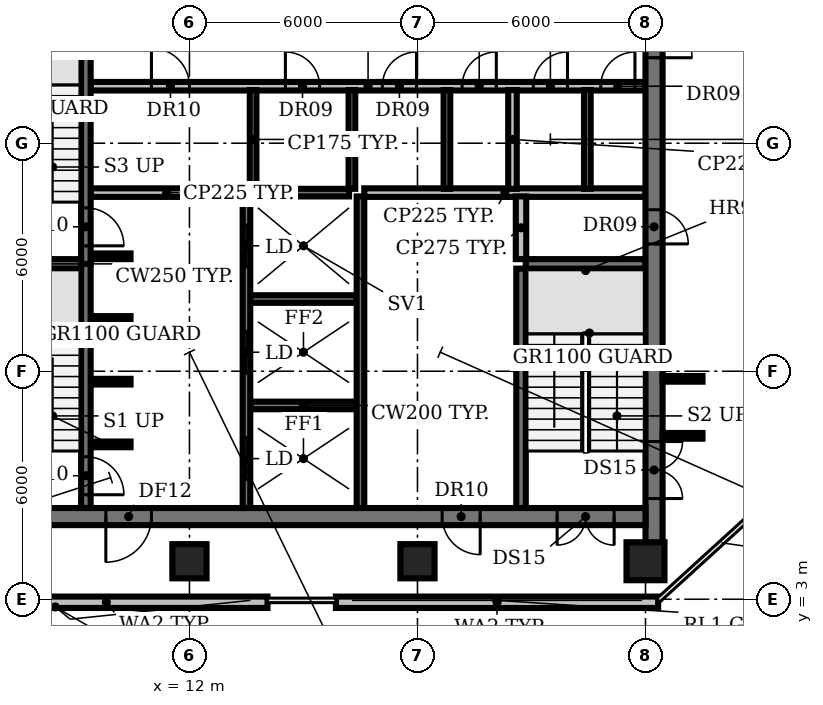
"""IFC4 building model, lengths in metres.
Left out: names, types, materials, properties, quantities, classifications, styles, units other than length and angle.
Written with IfcOpenShell. Run it as: python <this file> out.ifc"""

import sys

from ifc_helpers import new_model, si_unit, direction, frame, frame_2d, origin, origin_2d, place, context, subcontext, project, spatial, rectangle, circle, extrude, element, fill, save


model = new_model("IFC4")
c1 = context("Model", 3, precision=1e-05, world=origin(), true_north=direction((0.0, 1.0)))
c2 = subcontext(c1, "Body", "Model", "MODEL_VIEW")
j1 = project(units=[si_unit("LENGTHUNIT", "METRE"), si_unit("PLANEANGLEUNIT", "RADIAN")], contexts=[c1])
p1 = place(None, origin())
s1 = spatial("IfcSite", under=j1, at=p1, CompositionType="ELEMENT")
p2 = place(p1, origin())
s2 = spatial("IfcBuilding", under=s1, at=p2, CompositionType="ELEMENT")
p3 = place(p2, frame((0.0, 0.0, 205.4)))
s3 = spatial("IfcBuildingStorey", under=s2, at=p3, CompositionType="ELEMENT", Elevation=205.4)
for number, where, z_axis, x_axis in (
    (1, (12.0, 4.0, -0.35), (0.0, 0.0, 1.0), (1.0, 0.0, 0.0)),
    (2, (18.0, 4.0, -0.35), (0.0, 0.0, 1.0), (1.0, 0.0, 0.0)),
):
    element("IfcColumn", number, at=place(p3, frame(where, z_axis=z_axis, x_axis=x_axis)), inside=s3, PredefinedType="COLUMN", context=c2, shape_type="SweptSolid", body=[
        extrude(rectangle(XDim=0.9, YDim=0.9, at=origin_2d()), origin(), (0.0, 0.0, 1.0), 4.2),
    ])
p4 = place(p3, frame((24.0, 4.0, -0.35), z_axis=(0.0, 0.0, 1.0), x_axis=(1.0, 0.0, 0.0)))
e3 = element("IfcColumn", 3, at=p4, inside=s3, PredefinedType="COLUMN", context=c2, shape_type="SweptSolid", body=[
    extrude(circle(Radius=0.5, at=origin_2d()), origin(), (0.0, 0.0, 1.0), 4.2),
])
for number, where, z_axis, x_axis in (
    (4, (5.573, 2.92, 0.0), (0.0, 0.0, 1.0), (1.0, 0.0, 0.0)),
    (5, (15.854, 2.92, 0.0), (0.0, 0.0, 1.0), (1.0, 0.0, 0.0)),
):
    element("IfcWall", number, at=place(p3, frame(where, z_axis=z_axis, x_axis=x_axis)), inside=s3, PredefinedType="SOLIDWALL", context=c2, shape_type="SweptSolid", body=[
        extrude(rectangle(XDim=8.48, YDim=0.3, at=frame_2d((4.24, 0.0))), origin(), (0.0, 0.0, 1.0), 3.85),
    ])
p5 = place(p3, frame((9.4, 7.075, 0.0), z_axis=(0.0, 0.0, 1.0), x_axis=(1.0, 0.0, 0.0)))
e6 = element("IfcWall", 6, at=p5, inside=s3, PredefinedType="SHEAR", context=c2, shape_type="SweptSolid", body=[
    extrude(rectangle(XDim=1.05, YDim=0.15, at=frame_2d((0.525, 0.0))), origin(), (0.0, 0.0, 1.0), 3.85),
])
p6 = place(p3, frame((13.6, 8.1, 0.0), z_axis=(0.0, 0.0, 1.0), x_axis=(1.0, 0.0, 0.0)))
e7 = element("IfcWall", 7, at=p6, inside=s3, PredefinedType="SHEAR", context=c2, shape_type="SweptSolid", body=[
    extrude(rectangle(XDim=2.8, YDim=0.2, at=frame_2d((1.4, 0.0))), origin(), (0.0, 0.0, 1.0), 3.85),
])
for number, where, z_axis, x_axis in (
    (8, (9.4, 8.725, 0.0), (0.0, 0.0, 1.0), (1.0, 0.0, 0.0)),
    (9, (9.4, 10.375, 0.0), (0.0, 0.0, 1.0), (1.0, 0.0, 0.0)),
):
    element("IfcWall", number, at=place(p3, frame(where, z_axis=z_axis, x_axis=x_axis)), inside=s3, PredefinedType="SHEAR", context=c2, shape_type="SweptSolid", body=[
        extrude(rectangle(XDim=1.05, YDim=0.15, at=frame_2d((0.525, 0.0))), origin(), (0.0, 0.0, 1.0), 3.85),
    ])
p7 = place(p3, frame((13.6, 10.9, 0.0), z_axis=(0.0, 0.0, 1.0), x_axis=(1.0, 0.0, 0.0)))
e10 = element("IfcWall", 10, at=p7, inside=s3, PredefinedType="SHEAR", context=c2, shape_type="SweptSolid", body=[
    extrude(rectangle(XDim=2.8, YDim=0.2, at=frame_2d((1.4, 0.0))), origin(), (0.0, 0.0, 1.0), 3.85),
])
for number, where, z_axis, x_axis in (
    (11, (6.0, 11.825, 0.0), (0.0, 0.0, 1.0), (1.0, 0.0, 0.0)),
    (12, (20.85, 11.825, 0.0), (0.0, 0.0, 1.0), (1.0, 0.0, 0.0)),
):
    element("IfcWall", number, at=place(p3, frame(where, z_axis=z_axis, x_axis=x_axis)), inside=s3, PredefinedType="SHEAR", context=c2, shape_type="SweptSolid", body=[
        extrude(rectangle(XDim=3.15, YDim=0.25, at=frame_2d((1.575, 0.0))), origin(), (0.0, 0.0, 1.0), 3.85),
    ])
p8 = place(p3, frame((9.4, 12.025, 0.0), z_axis=(0.0, 0.0, 1.0), x_axis=(1.0, 0.0, 0.0)))
e13 = element("IfcWall", 13, at=p8, inside=s3, PredefinedType="SHEAR", context=c2, shape_type="SweptSolid", body=[
    extrude(rectangle(XDim=1.05, YDim=0.15, at=frame_2d((0.525, 0.0))), origin(), (0.0, 0.0, 1.0), 3.85),
])
p9 = place(p3, frame((9.4, 13.7, 0.0), z_axis=(0.0, 0.0, 1.0), x_axis=(1.0, 0.0, 0.0)))
e14 = element("IfcWall", 14, at=p9, inside=s3, PredefinedType="PARTITIONING", context=c2, shape_type="SweptSolid", body=[
    extrude(rectangle(XDim=4.0, YDim=0.225, at=frame_2d((2.0, 0.0))), origin(), (0.0, 0.0, 1.0), 3.85),
])
p10 = place(p3, frame((13.75, 13.7, 0.0), z_axis=(0.0, 0.0, 1.0), x_axis=(1.0, 0.0, 0.0)))
e15 = element("IfcWall", 15, at=p10, inside=s3, PredefinedType="SHEAR", context=c2, shape_type="SweptSolid", body=[
    extrude(rectangle(XDim=2.45, YDim=0.2, at=frame_2d((1.225, 0.0))), origin(), (0.0, 0.0, 1.0), 3.85),
])
p11 = place(p3, frame((16.6, 13.7, 0.0), z_axis=(0.0, 0.0, 1.0), x_axis=(1.0, 0.0, 0.0)))
e16 = element("IfcWall", 16, at=p11, inside=s3, PredefinedType="PARTITIONING", context=c2, shape_type="SweptSolid", body=[
    extrude(rectangle(XDim=7.4, YDim=0.225, at=frame_2d((3.7, 0.0))), origin(), (0.0, 0.0, 1.0), 3.85),
])
p12 = place(p3, frame((9.4, 16.5, 0.0), z_axis=(0.0, 0.0, 1.0), x_axis=(1.0, 0.0, 0.0)))
e17 = element("IfcWall", 17, at=p12, inside=s3, PredefinedType="PARTITIONING", context=c2, shape_type="SweptSolid", body=[
    extrude(rectangle(XDim=14.6, YDim=0.225, at=frame_2d((7.3, 0.0))), origin(), (0.0, 0.0, 1.0), 3.85),
])
p13 = place(p12, frame((1.6, 0.0, 0.0)))
e18 = element("IfcOpeningElement", 18, at=p13, cuts=e17, PredefinedType="OPENING", context=c2, shape_type="SweptSolid", body=[
    extrude(rectangle(XDim=1.0, YDim=2.1, at=frame_2d((0.5, 1.05))), frame((0.0, 0.123, 0.0), z_axis=(0.0, -1.0, 0.0), x_axis=(1.0, 0.0, 0.0)), (0.0, 0.0, 1.0), 0.245),
])
p14 = place(p12, frame((5.125, 0.0, 0.0)))
e19 = element("IfcOpeningElement", 19, at=p14, cuts=e17, PredefinedType="OPENING", context=c2, shape_type="SweptSolid", body=[
    extrude(rectangle(XDim=0.9, YDim=2.1, at=frame_2d((0.45, 1.05))), frame((0.0, 0.123, 0.0), z_axis=(0.0, -1.0, 0.0), x_axis=(1.0, 0.0, 0.0)), (0.0, 0.0, 1.0), 0.245),
])
p15 = place(p12, frame((7.675, 0.0, 0.0)))
e20 = element("IfcOpeningElement", 20, at=p15, cuts=e17, PredefinedType="OPENING", context=c2, shape_type="SweptSolid", body=[
    extrude(rectangle(XDim=0.9, YDim=2.1, at=frame_2d((0.45, 1.05))), frame((0.0, 0.123, 0.0), z_axis=(0.0, -1.0, 0.0), x_axis=(1.0, 0.0, 0.0)), (0.0, 0.0, 1.0), 0.245),
])
p16 = place(p12, frame((9.775, 0.0, 0.0)))
e21 = element("IfcOpeningElement", 21, at=p16, cuts=e17, PredefinedType="OPENING", context=c2, shape_type="SweptSolid", body=[
    extrude(rectangle(XDim=0.9, YDim=2.1, at=frame_2d((0.45, 1.05))), frame((0.0, 0.123, 0.0), z_axis=(0.0, -1.0, 0.0), x_axis=(1.0, 0.0, 0.0)), (0.0, 0.0, 1.0), 0.245),
])
p17 = place(p12, frame((11.647, 0.0, 0.0)))
e22 = element("IfcOpeningElement", 22, at=p17, cuts=e17, PredefinedType="OPENING", context=c2, shape_type="SweptSolid", body=[
    extrude(rectangle(XDim=0.9, YDim=2.1, at=frame_2d((0.45, 1.05))), frame((0.0, 0.123, 0.0), z_axis=(0.0, -1.0, 0.0), x_axis=(1.0, 0.0, 0.0)), (0.0, 0.0, 1.0), 0.245),
])
p18 = place(p12, frame((13.423, 0.0, 0.0)))
e23 = element("IfcOpeningElement", 23, at=p18, cuts=e17, PredefinedType="OPENING", context=c2, shape_type="SweptSolid", body=[
    extrude(rectangle(XDim=0.9, YDim=2.1, at=frame_2d((0.45, 1.05))), frame((0.0, 0.123, 0.0), z_axis=(0.0, -1.0, 0.0), x_axis=(1.0, 0.0, 0.0)), (0.0, 0.0, 1.0), 0.245),
])
p19 = place(p3, frame((9.275, 11.825, 0.0), z_axis=(0.0, 0.0, 1.0), x_axis=(0.0, -1.0, 0.0)))
e24 = element("IfcWall", 24, at=p19, inside=s3, PredefinedType="SHEAR", context=c2, shape_type="SweptSolid", body=[
    extrude(rectangle(XDim=6.425, YDim=0.25, at=frame_2d((3.212, 0.0))), origin(), (0.0, 0.0, 1.0), 3.85),
])
p20 = place(p19, frame((5.075, 0.0, 0.0)))
e25 = element("IfcOpeningElement", 25, at=p20, cuts=e24, PredefinedType="OPENING", context=c2, shape_type="SweptSolid", body=[
    extrude(rectangle(XDim=1.0, YDim=2.1, at=frame_2d((0.5, 1.05))), frame((0.0, 0.135, 0.0), z_axis=(0.0, -1.0, 0.0), x_axis=(1.0, 0.0, 0.0)), (0.0, 0.0, 1.0), 0.27),
])
p21 = place(p3, frame((9.275, 18.375, 0.0), z_axis=(0.0, 0.0, 1.0), x_axis=(0.0, -1.0, 0.0)))
e26 = element("IfcWall", 26, at=p21, inside=s3, PredefinedType="SHEAR", context=c2, shape_type="SweptSolid", body=[
    extrude(rectangle(XDim=6.55, YDim=0.25, at=frame_2d((3.275, 0.0))), origin(), (0.0, 0.0, 1.0), 3.85),
])
p22 = place(p21, frame((5.075, 0.0, 0.0)))
e27 = element("IfcOpeningElement", 27, at=p22, cuts=e26, PredefinedType="OPENING", context=c2, shape_type="SweptSolid", body=[
    extrude(rectangle(XDim=1.0, YDim=2.1, at=frame_2d((0.5, 1.05))), frame((0.0, 0.135, 0.0), z_axis=(0.0, -1.0, 0.0), x_axis=(1.0, 0.0, 0.0)), (0.0, 0.0, 1.0), 0.27),
])
p23 = place(p3, frame((13.5, 5.4, 0.0), z_axis=(0.0, 0.0, 1.0), x_axis=(0.0, 1.0, 0.0)))
e28 = element("IfcWall", 28, at=p23, inside=s3, PredefinedType="SHEAR", context=c2, shape_type="SweptSolid", body=[
    extrude(rectangle(XDim=8.2, YDim=0.2, at=frame_2d((4.1, 0.0))), origin(), (0.0, 0.0, 1.0), 3.85),
])
p24 = place(p23, frame((0.75, 0.0, 0.0)))
e29 = element("IfcOpeningElement", 29, at=p24, cuts=e28, PredefinedType="OPENING", context=c2, shape_type="SweptSolid", body=[
    extrude(rectangle(XDim=1.1, YDim=2.1, at=frame_2d((0.55, 1.05))), frame((0.0, 0.11, 0.0), z_axis=(0.0, -1.0, 0.0), x_axis=(1.0, 0.0, 0.0)), (0.0, 0.0, 1.0), 0.22),
])
p25 = place(p23, frame((3.55, 0.0, 0.0)))
e30 = element("IfcOpeningElement", 30, at=p25, cuts=e28, PredefinedType="OPENING", context=c2, shape_type="SweptSolid", body=[
    extrude(rectangle(XDim=1.1, YDim=2.1, at=frame_2d((0.55, 1.05))), frame((0.0, 0.11, 0.0), z_axis=(0.0, -1.0, 0.0), x_axis=(1.0, 0.0, 0.0)), (0.0, 0.0, 1.0), 0.22),
])
p26 = place(p23, frame((6.35, 0.0, 0.0)))
e31 = element("IfcOpeningElement", 31, at=p26, cuts=e28, PredefinedType="OPENING", context=c2, shape_type="SweptSolid", body=[
    extrude(rectangle(XDim=1.1, YDim=2.1, at=frame_2d((0.55, 1.05))), frame((0.0, 0.11, 0.0), z_axis=(0.0, -1.0, 0.0), x_axis=(1.0, 0.0, 0.0)), (0.0, 0.0, 1.0), 0.22),
])
for number, where, z_axis, x_axis in (
    (32, (13.675, 13.8, 0.0), (0.0, 0.0, 1.0), (0.0, 1.0, 0.0)),
    (33, (16.275, 13.8, 0.0), (0.0, 0.0, 1.0), (0.0, 1.0, 0.0)),
):
    element("IfcWall", number, at=place(p3, frame(where, z_axis=z_axis, x_axis=x_axis)), inside=s3, PredefinedType="PARTITIONING", context=c2, shape_type="SweptSolid", body=[
        extrude(rectangle(XDim=2.6, YDim=0.175, at=frame_2d((1.3, 0.0))), origin(), (0.0, 0.0, 1.0), 3.85),
    ])
p27 = place(p3, frame((16.5, 5.4, 0.0), z_axis=(0.0, 0.0, 1.0), x_axis=(0.0, 1.0, 0.0)))
e34 = element("IfcWall", 34, at=p27, inside=s3, PredefinedType="SHEAR", context=c2, shape_type="SweptSolid", body=[
    extrude(rectangle(XDim=8.2, YDim=0.2, at=frame_2d((4.1, 0.0))), origin(), (0.0, 0.0, 1.0), 3.85),
])
p28 = place(p3, frame((18.775, 13.8, 0.0), z_axis=(0.0, 0.0, 1.0), x_axis=(0.0, 1.0, 0.0)))
e35 = element("IfcWall", 35, at=p28, inside=s3, PredefinedType="PARTITIONING", context=c2, shape_type="SweptSolid", body=[
    extrude(rectangle(XDim=2.6, YDim=0.175, at=frame_2d((1.3, 0.0))), origin(), (0.0, 0.0, 1.0), 3.85),
])
p29 = place(p3, frame((20.5, 13.8, 0.0), z_axis=(0.0, 0.0, 1.0), x_axis=(0.0, 1.0, 0.0)))
e36 = element("IfcWall", 36, at=p29, inside=s3, PredefinedType="PARTITIONING", context=c2, shape_type="SweptSolid", body=[
    extrude(rectangle(XDim=2.6, YDim=0.225, at=frame_2d((1.3, 0.0))), origin(), (0.0, 0.0, 1.0), 3.85),
])
p30 = place(p3, frame((20.725, 5.4, 0.0), z_axis=(0.0, 0.0, 1.0), x_axis=(0.0, 1.0, 0.0)))
e37 = element("IfcWall", 37, at=p30, inside=s3, PredefinedType="SHEAR", context=c2, shape_type="SweptSolid", body=[
    extrude(rectangle(XDim=6.3, YDim=0.25, at=frame_2d((3.15, 0.0))), origin(), (0.0, 0.0, 1.0), 3.85),
])
p31 = place(p3, frame((20.725, 11.95, 0.0), z_axis=(0.0, 0.0, 1.0), x_axis=(0.0, 1.0, 0.0)))
e38 = element("IfcWall", 38, at=p31, inside=s3, PredefinedType="PARTITIONING", context=c2, shape_type="SweptSolid", body=[
    extrude(rectangle(XDim=1.65, YDim=0.275, at=frame_2d((0.825, 0.0))), origin(), (0.0, 0.0, 1.0), 3.85),
])
p32 = place(p3, frame((22.47, 13.8, 0.0), z_axis=(0.0, 0.0, 1.0), x_axis=(0.0, 1.0, 0.0)))
e39 = element("IfcWall", 39, at=p32, inside=s3, PredefinedType="PARTITIONING", context=c2, shape_type="SweptSolid", body=[
    extrude(rectangle(XDim=2.6, YDim=0.175, at=frame_2d((1.3, 0.0))), origin(), (0.0, 0.0, 1.0), 3.85),
])
p33 = place(p3, frame((24.225, 25.25, 0.0), z_axis=(0.0, 0.0, 1.0), x_axis=(0.0, -1.0, 0.0)))
e40 = element("IfcWall", 40, at=p33, inside=s3, PredefinedType="SHEAR", context=c2, shape_type="SweptSolid", body=[
    extrude(rectangle(XDim=20.78, YDim=0.45, at=frame_2d((10.39, 0.0))), origin(), (0.0, 0.0, 1.0), 3.85),
])
p34 = place(p33, frame((18.1, 0.0, 0.0)))
e41 = element("IfcOpeningElement", 41, at=p34, cuts=e40, PredefinedType="OPENING", context=c2, shape_type="SweptSolid", body=[
    extrude(rectangle(XDim=1.5, YDim=2.1, at=frame_2d((0.75, 1.05))), frame((0.0, 0.235, 0.0), z_axis=(0.0, -1.0, 0.0), x_axis=(1.0, 0.0, 0.0)), (0.0, 0.0, 1.0), 0.47),
])
p35 = place(p33, frame((12.0, 0.0, 0.0)))
e42 = element("IfcOpeningElement", 42, at=p35, cuts=e40, PredefinedType="OPENING", context=c2, shape_type="SweptSolid", body=[
    extrude(rectangle(XDim=0.9, YDim=2.1, at=frame_2d((0.45, 1.05))), frame((0.0, 0.235, 0.0), z_axis=(0.0, -1.0, 0.0), x_axis=(1.0, 0.0, 0.0)), (0.0, 0.0, 1.0), 0.47),
])
p36 = place(p33, frame((6.0, 0.0, 0.0)))
e43 = element("IfcOpeningElement", 43, at=p36, cuts=e40, PredefinedType="OPENING", context=c2, shape_type="SweptSolid", body=[
    extrude(rectangle(XDim=2.0, YDim=2.1, at=frame_2d((1.0, 1.05))), frame((0.0, 0.235, 0.0), z_axis=(0.0, -1.0, 0.0), x_axis=(1.0, 0.0, 0.0)), (0.0, 0.0, 1.0), 0.47),
])
p37 = place(p3, frame((24.0, 5.175, 0.0), z_axis=(0.0, 0.0, 1.0), x_axis=(-1.0, 0.0, 0.0)))
e44 = element("IfcWall", 44, at=p37, inside=s3, PredefinedType="SHEAR", context=c2, shape_type="SweptSolid", body=[
    extrude(rectangle(XDim=18.0, YDim=0.45, at=frame_2d((9.0, 0.0))), origin(), (0.0, 0.0, 1.0), 3.85),
])
p38 = place(p37, frame((0.825, 0.0, 0.0)))
e45 = element("IfcOpeningElement", 45, at=p38, cuts=e44, PredefinedType="OPENING", context=c2, shape_type="SweptSolid", body=[
    extrude(rectangle(XDim=1.5, YDim=2.1, at=frame_2d((0.75, 1.05))), frame((0.0, 0.235, 0.0), z_axis=(0.0, -1.0, 0.0), x_axis=(1.0, 0.0, 0.0)), (0.0, 0.0, 1.0), 0.47),
])
p39 = place(p37, frame((15.675, 0.0, 0.0)))
e46 = element("IfcOpeningElement", 46, at=p39, cuts=e44, PredefinedType="OPENING", context=c2, shape_type="SweptSolid", body=[
    extrude(rectangle(XDim=1.5, YDim=2.1, at=frame_2d((0.75, 1.05))), frame((0.0, 0.235, 0.0), z_axis=(0.0, -1.0, 0.0), x_axis=(1.0, 0.0, 0.0)), (0.0, 0.0, 1.0), 0.47),
])
p40 = place(p37, frame((13.0, 0.0, 0.0)))
e47 = element("IfcOpeningElement", 47, at=p40, cuts=e44, PredefinedType="OPENING", context=c2, shape_type="SweptSolid", body=[
    extrude(rectangle(XDim=1.2, YDim=2.1, at=frame_2d((0.6, 1.05))), frame((0.0, 0.235, 0.0), z_axis=(0.0, -1.0, 0.0), x_axis=(1.0, 0.0, 0.0)), (0.0, 0.0, 1.0), 0.47),
])
p41 = place(p37, frame((4.35, 0.0, 0.0)))
e48 = element("IfcOpeningElement", 48, at=p41, cuts=e44, PredefinedType="OPENING", context=c2, shape_type="SweptSolid", body=[
    extrude(rectangle(XDim=1.0, YDim=2.1, at=frame_2d((0.5, 1.05))), frame((0.0, 0.235, 0.0), z_axis=(0.0, -1.0, 0.0), x_axis=(1.0, 0.0, 0.0)), (0.0, 0.0, 1.0), 0.47),
])
for number, where, z_axis, x_axis in (
    (49, (24.45, 7.3, 0.0), (0.0, 0.0, 1.0), (1.0, 0.0, 0.0)),
    (50, (24.45, 8.8, 0.0), (0.0, 0.0, 1.0), (1.0, 0.0, 0.0)),
):
    element("IfcWall", number, at=place(p3, frame(where, z_axis=z_axis, x_axis=x_axis)), inside=s3, PredefinedType="PARTITIONING", context=c2, shape_type="SweptSolid", body=[
        extrude(rectangle(XDim=1.05, YDim=0.15, at=frame_2d((0.525, 0.0))), origin(), (0.0, 0.0, 1.0), 2.88),
    ])
p42 = place(p13, origin())
e51 = element("IfcDoor", 51, at=p42, inside=s3, OperationType="SINGLE_SWING_LEFT", PredefinedType="DOOR", context=c2, shape_type="SweptSolid", body=[
    extrude(rectangle(XDim=1.0, YDim=2.1, at=frame_2d((0.5, 1.05))), frame((0.0, 0.025, 0.0), z_axis=(0.0, -1.0, 0.0), x_axis=(1.0, 0.0, 0.0)), (0.0, 0.0, 1.0), 0.05),
])
fill(e18, e51)
p43 = place(p14, origin())
e52 = element("IfcDoor", 52, at=p43, inside=s3, OperationType="SINGLE_SWING_LEFT", PredefinedType="DOOR", context=c2, shape_type="SweptSolid", body=[
    extrude(rectangle(XDim=0.9, YDim=2.1, at=frame_2d((0.45, 1.05))), frame((0.0, 0.025, 0.0), z_axis=(0.0, -1.0, 0.0), x_axis=(1.0, 0.0, 0.0)), (0.0, 0.0, 1.0), 0.05),
])
fill(e19, e52)
p44 = place(p15, origin())
e53 = element("IfcDoor", 53, at=p44, inside=s3, OperationType="SINGLE_SWING_RIGHT", PredefinedType="DOOR", context=c2, shape_type="SweptSolid", body=[
    extrude(rectangle(XDim=0.9, YDim=2.1, at=frame_2d((0.45, 1.05))), frame((0.0, 0.025, 0.0), z_axis=(0.0, -1.0, 0.0), x_axis=(1.0, 0.0, 0.0)), (0.0, 0.0, 1.0), 0.05),
])
fill(e20, e53)
p45 = place(p16, origin())
e54 = element("IfcDoor", 54, at=p45, inside=s3, OperationType="SINGLE_SWING_RIGHT", PredefinedType="DOOR", context=c2, shape_type="SweptSolid", body=[
    extrude(rectangle(XDim=0.9, YDim=2.1, at=frame_2d((0.45, 1.05))), frame((0.0, 0.025, 0.0), z_axis=(0.0, -1.0, 0.0), x_axis=(1.0, 0.0, 0.0)), (0.0, 0.0, 1.0), 0.05),
])
fill(e21, e54)
p46 = place(p17, origin())
e55 = element("IfcDoor", 55, at=p46, inside=s3, OperationType="SINGLE_SWING_RIGHT", PredefinedType="DOOR", context=c2, shape_type="SweptSolid", body=[
    extrude(rectangle(XDim=0.9, YDim=2.1, at=frame_2d((0.45, 1.05))), frame((0.0, 0.025, 0.0), z_axis=(0.0, -1.0, 0.0), x_axis=(1.0, 0.0, 0.0)), (0.0, 0.0, 1.0), 0.05),
])
fill(e22, e55)
p47 = place(p18, origin())
e56 = element("IfcDoor", 56, at=p47, inside=s3, OperationType="SINGLE_SWING_RIGHT", PredefinedType="DOOR", context=c2, shape_type="SweptSolid", body=[
    extrude(rectangle(XDim=0.9, YDim=2.1, at=frame_2d((0.45, 1.05))), frame((0.0, 0.025, 0.0), z_axis=(0.0, -1.0, 0.0), x_axis=(1.0, 0.0, 0.0)), (0.0, 0.0, 1.0), 0.05),
])
fill(e23, e56)
p48 = place(p20, origin())
e57 = element("IfcDoor", 57, at=p48, inside=s3, OperationType="SINGLE_SWING_RIGHT", PredefinedType="DOOR", context=c2, shape_type="SweptSolid", body=[
    extrude(rectangle(XDim=1.0, YDim=2.1, at=frame_2d((0.5, 1.05))), frame((0.0, 0.025, 0.0), z_axis=(0.0, -1.0, 0.0), x_axis=(1.0, 0.0, 0.0)), (0.0, 0.0, 1.0), 0.05),
])
fill(e25, e57)
p49 = place(p22, origin())
e58 = element("IfcDoor", 58, at=p49, inside=s3, OperationType="SINGLE_SWING_RIGHT", PredefinedType="DOOR", context=c2, shape_type="SweptSolid", body=[
    extrude(rectangle(XDim=1.0, YDim=2.1, at=frame_2d((0.5, 1.05))), frame((0.0, 0.025, 0.0), z_axis=(0.0, -1.0, 0.0), x_axis=(1.0, 0.0, 0.0)), (0.0, 0.0, 1.0), 0.05),
])
fill(e27, e58)
p50 = place(p24, origin())
e59 = element("IfcDoor", 59, at=p50, inside=s3, OperationType="DOUBLE_DOOR_SLIDING", PredefinedType="DOOR", context=c2, shape_type="SweptSolid", body=[
    extrude(rectangle(XDim=1.1, YDim=2.1, at=frame_2d((0.55, 1.05))), frame((0.0, 0.025, 0.0), z_axis=(0.0, -1.0, 0.0), x_axis=(1.0, 0.0, 0.0)), (0.0, 0.0, 1.0), 0.05),
])
fill(e29, e59)
p51 = place(p25, origin())
e60 = element("IfcDoor", 60, at=p51, inside=s3, OperationType="DOUBLE_DOOR_SLIDING", PredefinedType="DOOR", context=c2, shape_type="SweptSolid", body=[
    extrude(rectangle(XDim=1.1, YDim=2.1, at=frame_2d((0.55, 1.05))), frame((0.0, 0.025, 0.0), z_axis=(0.0, -1.0, 0.0), x_axis=(1.0, 0.0, 0.0)), (0.0, 0.0, 1.0), 0.05),
])
fill(e30, e60)
p52 = place(p26, origin())
e61 = element("IfcDoor", 61, at=p52, inside=s3, OperationType="DOUBLE_DOOR_SLIDING", PredefinedType="DOOR", context=c2, shape_type="SweptSolid", body=[
    extrude(rectangle(XDim=1.1, YDim=2.1, at=frame_2d((0.55, 1.05))), frame((0.0, 0.025, 0.0), z_axis=(0.0, -1.0, 0.0), x_axis=(1.0, 0.0, 0.0)), (0.0, 0.0, 1.0), 0.05),
])
fill(e31, e61)
p53 = place(p34, origin())
e62 = element("IfcDoor", 62, at=p53, inside=s3, OperationType="DOUBLE_DOOR_SINGLE_SWING", PredefinedType="DOOR", context=c2, shape_type="SweptSolid", body=[
    extrude(rectangle(XDim=1.5, YDim=2.1, at=frame_2d((0.75, 1.05))), frame((0.0, 0.025, 0.0), z_axis=(0.0, -1.0, 0.0), x_axis=(1.0, 0.0, 0.0)), (0.0, 0.0, 1.0), 0.05),
])
fill(e41, e62)
p54 = place(p35, origin())
e63 = element("IfcDoor", 63, at=p54, inside=s3, OperationType="SINGLE_SWING_RIGHT", PredefinedType="DOOR", context=c2, shape_type="SweptSolid", body=[
    extrude(rectangle(XDim=0.9, YDim=2.1, at=frame_2d((0.45, 1.05))), frame((0.0, 0.025, 0.0), z_axis=(0.0, -1.0, 0.0), x_axis=(1.0, 0.0, 0.0)), (0.0, 0.0, 1.0), 0.05),
])
fill(e42, e63)
p55 = place(p36, origin())
e64 = element("IfcDoor", 64, at=p55, inside=s3, OperationType="DOUBLE_DOOR_SINGLE_SWING", PredefinedType="DOOR", context=c2, shape_type="SweptSolid", body=[
    extrude(rectangle(XDim=2.0, YDim=2.1, at=frame_2d((1.0, 1.05))), frame((0.0, 0.025, 0.0), z_axis=(0.0, -1.0, 0.0), x_axis=(1.0, 0.0, 0.0)), (0.0, 0.0, 1.0), 0.05),
])
fill(e43, e64)
p56 = place(p38, origin())
e65 = element("IfcDoor", 65, at=p56, inside=s3, OperationType="DOUBLE_DOOR_SINGLE_SWING", PredefinedType="DOOR", context=c2, shape_type="SweptSolid", body=[
    extrude(rectangle(XDim=1.5, YDim=2.1, at=frame_2d((0.75, 1.05))), frame((0.0, 0.025, 0.0), z_axis=(0.0, -1.0, 0.0), x_axis=(1.0, 0.0, 0.0)), (0.0, 0.0, 1.0), 0.05),
])
fill(e45, e65)
p57 = place(p40, origin())
e66 = element("IfcDoor", 66, at=p57, inside=s3, OperationType="SINGLE_SWING_RIGHT", PredefinedType="DOOR", context=c2, shape_type="SweptSolid", body=[
    extrude(rectangle(XDim=1.2, YDim=2.1, at=frame_2d((0.6, 1.05))), frame((0.0, 0.025, 0.0), z_axis=(0.0, -1.0, 0.0), x_axis=(1.0, 0.0, 0.0)), (0.0, 0.0, 1.0), 0.05),
])
fill(e47, e66)
p58 = place(p41, origin())
e67 = element("IfcDoor", 67, at=p58, inside=s3, OperationType="SINGLE_SWING_LEFT", PredefinedType="DOOR", context=c2, shape_type="SweptSolid", body=[
    extrude(rectangle(XDim=1.0, YDim=2.1, at=frame_2d((0.5, 1.05))), frame((0.0, 0.025, 0.0), z_axis=(0.0, -1.0, 0.0), x_axis=(1.0, 0.0, 0.0)), (0.0, 0.0, 1.0), 0.05),
])
fill(e48, e67)
save(model, sys.argv[1])
